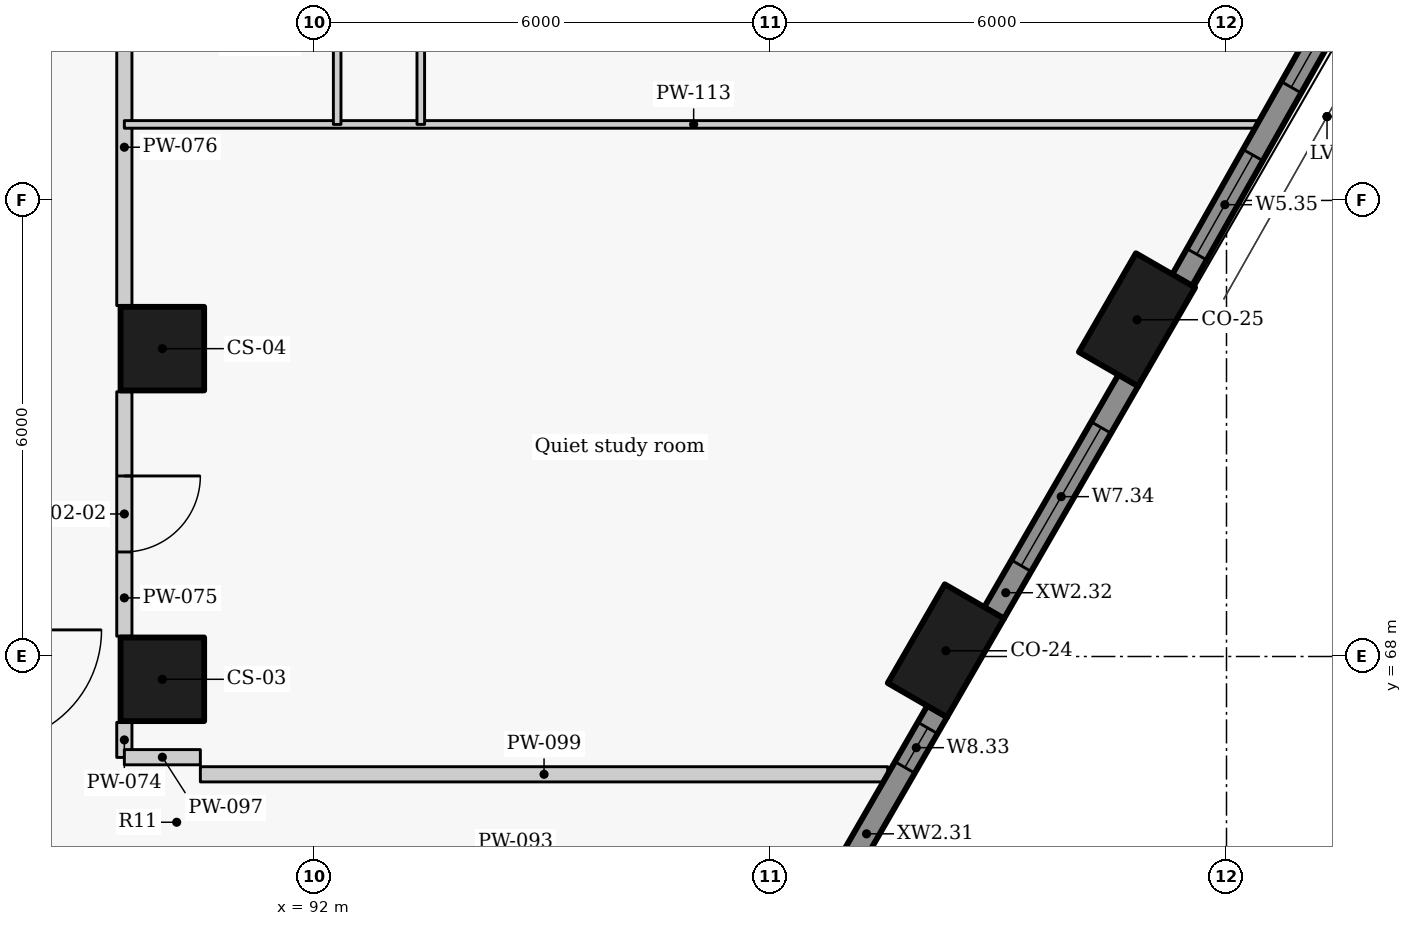
"""IFC4 building model, lengths in metres.
Left out: names, types, materials, properties, quantities, classifications, styles, units other than length and angle.
Written with IfcOpenShell. Run it as: python <this file> out.ifc"""

import sys

from ifc_helpers import new_model, si_unit, direction, frame, frame_2d, origin, origin_2d, place, context, subcontext, project, spatial, rectangle, extrude, element, fill, save


model = new_model("IFC4")
c1 = context("Model", 3, precision=1e-05, world=origin(), true_north=direction((0.0, 1.0)))
c2 = subcontext(c1, "Body", "Model", "MODEL_VIEW")
j1 = project(units=[si_unit("LENGTHUNIT", "METRE"), si_unit("PLANEANGLEUNIT", "RADIAN")], contexts=[c1])
p1 = place(None, origin())
s1 = spatial("IfcSite", under=j1, at=p1, CompositionType="ELEMENT")
p2 = place(p1, origin())
s2 = spatial("IfcBuilding", under=s1, at=p2, CompositionType="ELEMENT")
p3 = place(p2, frame((0.0, 0.0, 67.8)))
s3 = spatial("IfcBuildingStorey", under=s2, at=p3, CompositionType="ELEMENT", Elevation=67.8)
for number, where, z_axis, x_axis in (
    (1, (100.308, 68.075, 0.0), (0.0, 0.0, 1.0), (0.5, 0.866, 0.0)),
    (2, (102.823, 72.43, 0.0), (0.0, 0.0, 1.0), (0.5, 0.866, 0.0)),
):
    element("IfcColumn", number, at=place(p3, frame(where, z_axis=z_axis, x_axis=x_axis)), inside=s3, PredefinedType="COLUMN", context=c2, shape_type="SweptSolid", body=[
        extrude(rectangle(XDim=1.5, YDim=0.9, at=origin_2d()), origin(), (0.0, 0.0, 1.0), 3.3),
    ])
for number, where, z_axis, x_axis in (
    (3, (90.0, 67.7, 0.0), (0.0, 0.0, 1.0), (0.0, 1.0, 0.0)),
    (4, (90.0, 72.05, 0.0), (0.0, 0.0, 1.0), (0.0, 1.0, 0.0)),
):
    element("IfcColumn", number, at=place(p3, frame(where, z_axis=z_axis, x_axis=x_axis)), inside=s3, PredefinedType="COLUMN", context=c2, shape_type="SweptSolid", body=[
        extrude(rectangle(XDim=1.1, YDim=1.1, at=origin_2d()), origin(), (0.0, 0.0, 1.0), 3.3),
    ])
p4 = place(p3, frame((98.278, 63.959, 0.0), z_axis=(0.0, 0.0, 1.0), x_axis=(0.500001735503, 0.866024401789, 0.0)))
e5 = element("IfcWall", 5, at=p4, inside=s3, PredefinedType="SOLIDWALL", context=c2, shape_type="SweptSolid", body=[
    extrude(rectangle(XDim=3.834, YDim=0.3, at=frame_2d((1.917, 0.0))), origin(), (0.0, 0.0, 1.0), 2.05),
])
p5 = place(p4, frame((0.364, 0.0, 0.9)))
e6 = element("IfcOpeningElement", 6, at=p5, cuts=e5, PredefinedType="OPENING", context=c2, shape_type="SweptSolid", body=[
    extrude(rectangle(XDim=0.6, YDim=1.1, at=frame_2d((0.3, 0.55))), frame((0.0, 0.16, 0.0), z_axis=(0.0, -1.0, 0.0), x_axis=(1.0, 0.0, 0.0)), (0.0, 0.0, 1.0), 0.32),
])
p6 = place(p4, frame((2.981, 0.0, 0.9)))
e7 = element("IfcOpeningElement", 7, at=p6, cuts=e5, PredefinedType="OPENING", context=c2, shape_type="SweptSolid", body=[
    extrude(rectangle(XDim=0.6, YDim=1.1, at=frame_2d((0.3, 0.55))), frame((0.0, 0.16, 0.0), z_axis=(0.0, -1.0, 0.0), x_axis=(1.0, 0.0, 0.0)), (0.0, 0.0, 1.0), 0.32),
])
p7 = place(p3, frame((100.941, 68.571, 0.0), z_axis=(0.0, 0.0, 1.0), x_axis=(0.499977402622, 0.866038449993, 0.0)))
e8 = element("IfcWall", 8, at=p7, inside=s3, PredefinedType="SOLIDWALL", context=c2, shape_type="SweptSolid", body=[
    extrude(rectangle(XDim=3.537, YDim=0.3, at=frame_2d((1.769, 0.0))), origin(), (0.0, 0.0, 1.0), 2.05),
])
p8 = place(p7, frame((0.719, 0.0, 0.9)))
e9 = element("IfcOpeningElement", 9, at=p8, cuts=e8, PredefinedType="OPENING", context=c2, shape_type="SweptSolid", body=[
    extrude(rectangle(XDim=2.1, YDim=1.1, at=frame_2d((1.05, 0.55))), frame((0.0, 0.16, 0.0), z_axis=(0.0, -1.0, 0.0), x_axis=(1.0, 0.0, 0.0)), (0.0, 0.0, 1.0), 0.32),
])
p9 = place(p3, frame((103.416, 72.949, 0.0), z_axis=(0.0, 0.0, 1.0), x_axis=(0.492363204642, 0.870389840655, 0.0)))
e10 = element("IfcWall", 10, at=p9, inside=s3, PredefinedType="SOLIDWALL", context=c2, shape_type="SweptSolid", body=[
    extrude(rectangle(XDim=5.626, YDim=0.3, at=frame_2d((2.813, 0.0))), origin(), (0.0, 0.0, 1.0), 2.05),
])
p10 = place(p9, frame((0.393, 0.0, 0.9)))
e11 = element("IfcOpeningElement", 11, at=p10, cuts=e10, PredefinedType="OPENING", context=c2, shape_type="SweptSolid", body=[
    extrude(rectangle(XDim=1.5, YDim=1.1, at=frame_2d((0.75, 0.55))), frame((0.0, 0.16, 0.0), z_axis=(0.0, -1.0, 0.0), x_axis=(1.0, 0.0, 0.0)), (0.0, 0.0, 1.0), 0.32),
])
p11 = place(p9, frame((2.917, 0.0, 0.9)))
e12 = element("IfcOpeningElement", 12, at=p11, cuts=e10, PredefinedType="OPENING", context=c2, shape_type="SweptSolid", body=[
    extrude(rectangle(XDim=1.5, YDim=1.1, at=frame_2d((0.75, 0.55))), frame((0.0, 0.16, 0.0), z_axis=(0.0, -1.0, 0.0), x_axis=(1.0, 0.0, 0.0)), (0.0, 0.0, 1.0), 0.32),
])
p12 = place(p3, frame((89.5, 66.672, 0.0), z_axis=(0.0, 0.0, 1.0), x_axis=(0.0, 1.0, 0.0)))
e13 = element("IfcWall", 13, at=p12, inside=s3, PredefinedType="PARTITIONING", context=c2, shape_type="SweptSolid", body=[
    extrude(rectangle(XDim=0.461, YDim=0.2, at=frame_2d((0.23, 0.0))), origin(), (0.0, 0.0, 1.0), 2.95),
])
p13 = place(p3, frame((89.5, 71.483, 0.0), z_axis=(0.0, 0.0, 1.0), x_axis=(0.0, -1.0, 0.0)))
e14 = element("IfcWall", 14, at=p13, inside=s3, PredefinedType="PARTITIONING", context=c2, shape_type="SweptSolid", body=[
    extrude(rectangle(XDim=3.216, YDim=0.2, at=frame_2d((1.608, 0.0))), origin(), (0.0, 0.0, 1.0), 2.95),
])
p14 = place(p13, frame((1.108, 0.0, 0.0)))
e15 = element("IfcOpeningElement", 15, at=p14, cuts=e14, PredefinedType="OPENING", context=c2, shape_type="SweptSolid", body=[
    extrude(rectangle(XDim=1.0, YDim=2.1, at=frame_2d((0.5, 1.05))), frame((0.0, 0.11, 0.0), z_axis=(0.0, -1.0, 0.0), x_axis=(1.0, 0.0, 0.0)), (0.0, 0.0, 1.0), 0.22),
])
p15 = place(p3, frame((89.5, 72.617, 0.0), z_axis=(0.0, 0.0, 1.0), x_axis=(0.0, 1.0, 0.0)))
e16 = element("IfcWall", 16, at=p15, inside=s3, PredefinedType="PARTITIONING", context=c2, shape_type="SweptSolid", body=[
    extrude(rectangle(XDim=4.166, YDim=0.2, at=frame_2d((2.083, 0.0))), origin(), (0.0, 0.0, 1.0), 2.95),
])
p16 = place(p3, frame((89.5, 66.675, 0.0), z_axis=(0.0, 0.0, 1.0), x_axis=(1.0, 0.0, 0.0)))
e17 = element("IfcWall", 17, at=p16, inside=s3, PredefinedType="PARTITIONING", context=c2, shape_type="SweptSolid", body=[
    extrude(rectangle(XDim=1.0, YDim=0.2, at=frame_2d((0.5, 0.0))), origin(), (0.0, 0.0, 1.0), 2.43),
])
p17 = place(p3, frame((90.5, 66.45, 0.0), z_axis=(0.0, 0.0, 1.0), x_axis=(1.0, 0.0, 0.0)))
e18 = element("IfcWall", 18, at=p17, inside=s3, PredefinedType="PARTITIONING", context=c2, shape_type="SweptSolid", body=[
    extrude(rectangle(XDim=9.043, YDim=0.2, at=frame_2d((4.521, 0.0))), origin(), (0.0, 0.0, 1.0), 2.03),
])
p18 = place(p3, frame((89.5, 75.0, 0.0), z_axis=(0.0, 0.0, 1.0), x_axis=(1.0, 0.0, 0.0)))
e19 = element("IfcWall", 19, at=p18, inside=s3, PredefinedType="PARTITIONING", context=c2, shape_type="SweptSolid", body=[
    extrude(rectangle(XDim=14.979, YDim=0.1, at=frame_2d((7.49, 0.0))), origin(), (0.0, 0.0, 1.0), 2.03),
])
p19 = place(p3, frame((92.3, 75.0, 0.0), z_axis=(0.0, 0.0, 1.0), x_axis=(0.0, 1.0, 0.0)))
e20 = element("IfcWall", 20, at=p19, inside=s3, PredefinedType="PARTITIONING", context=c2, shape_type="SweptSolid", body=[
    extrude(rectangle(XDim=8.4, YDim=0.1, at=frame_2d((4.2, 0.0))), origin(), (0.0, 0.0, 1.0), 2.95),
])
p20 = place(p19, frame((1.841, 0.0, 0.0)))
e21 = element("IfcOpeningElement", 21, at=p20, cuts=e20, PredefinedType="OPENING", context=c2, shape_type="SweptSolid", body=[
    extrude(rectangle(XDim=0.9, YDim=2.1, at=frame_2d((0.45, 1.05))), frame((0.0, 0.06, 0.0), z_axis=(0.0, -1.0, 0.0), x_axis=(1.0, 0.0, 0.0)), (0.0, 0.0, 1.0), 0.12),
])
p21 = place(p19, frame((6.066, 0.0, 0.0)))
e22 = element("IfcOpeningElement", 22, at=p21, cuts=e20, PredefinedType="OPENING", context=c2, shape_type="SweptSolid", body=[
    extrude(rectangle(XDim=0.85, YDim=2.1, at=frame_2d((0.425, 1.05))), frame((0.0, 0.06, 0.0), z_axis=(0.0, -1.0, 0.0), x_axis=(1.0, 0.0, 0.0)), (0.0, 0.0, 1.0), 0.12),
])
p22 = place(p3, frame((93.4, 94.25, 0.0), z_axis=(0.0, 0.0, 1.0), x_axis=(0.0, -1.0, 0.0)))
e23 = element("IfcWall", 23, at=p22, inside=s3, PredefinedType="PARTITIONING", context=c2, shape_type="SweptSolid", body=[
    extrude(rectangle(XDim=19.25, YDim=0.1, at=frame_2d((9.625, 0.0))), origin(), (0.0, 0.0, 1.0), 2.95),
])
p23 = place(p22, frame((17.348, 0.0, 0.0)))
e24 = element("IfcOpeningElement", 24, at=p23, cuts=e23, PredefinedType="OPENING", context=c2, shape_type="SweptSolid", body=[
    extrude(rectangle(XDim=0.9, YDim=2.1, at=frame_2d((0.45, 1.05))), frame((0.0, 0.06, 0.0), z_axis=(0.0, -1.0, 0.0), x_axis=(1.0, 0.0, 0.0)), (0.0, 0.0, 1.0), 0.12),
])
p24 = place(p22, frame((14.445, 0.0, 0.0)))
e25 = element("IfcOpeningElement", 25, at=p24, cuts=e23, PredefinedType="OPENING", context=c2, shape_type="SweptSolid", body=[
    extrude(rectangle(XDim=0.9, YDim=2.1, at=frame_2d((0.45, 1.05))), frame((0.0, 0.06, 0.0), z_axis=(0.0, -1.0, 0.0), x_axis=(1.0, 0.0, 0.0)), (0.0, 0.0, 1.0), 0.12),
])
p25 = place(p22, frame((10.897, 0.0, 0.0)))
e26 = element("IfcOpeningElement", 26, at=p25, cuts=e23, PredefinedType="OPENING", context=c2, shape_type="SweptSolid", body=[
    extrude(rectangle(XDim=0.9, YDim=2.1, at=frame_2d((0.45, 1.05))), frame((0.0, 0.06, 0.0), z_axis=(0.0, -1.0, 0.0), x_axis=(1.0, 0.0, 0.0)), (0.0, 0.0, 1.0), 0.12),
])
p26 = place(p22, frame((7.4, 0.0, 0.0)))
e27 = element("IfcOpeningElement", 27, at=p26, cuts=e23, PredefinedType="OPENING", context=c2, shape_type="SweptSolid", body=[
    extrude(rectangle(XDim=0.9, YDim=2.1, at=frame_2d((0.45, 1.05))), frame((0.0, 0.06, 0.0), z_axis=(0.0, -1.0, 0.0), x_axis=(1.0, 0.0, 0.0)), (0.0, 0.0, 1.0), 0.12),
])
p27 = place(p22, frame((4.6, 0.0, 0.0)))
e28 = element("IfcOpeningElement", 28, at=p27, cuts=e23, PredefinedType="OPENING", context=c2, shape_type="SweptSolid", body=[
    extrude(rectangle(XDim=0.9, YDim=2.1, at=frame_2d((0.45, 1.05))), frame((0.0, 0.06, 0.0), z_axis=(0.0, -1.0, 0.0), x_axis=(1.0, 0.0, 0.0)), (0.0, 0.0, 1.0), 0.12),
])
p28 = place(p22, frame((1.375, 0.0, 0.0)))
e29 = element("IfcOpeningElement", 29, at=p28, cuts=e23, PredefinedType="OPENING", context=c2, shape_type="SweptSolid", body=[
    extrude(rectangle(XDim=0.9, YDim=2.1, at=frame_2d((0.45, 1.05))), frame((0.0, 0.06, 0.0), z_axis=(0.0, -1.0, 0.0), x_axis=(1.0, 0.0, 0.0)), (0.0, 0.0, 1.0), 0.12),
])
p29 = place(p6, origin())
e30 = element("IfcWindow", 30, at=p29, inside=s3, PartitioningType="SINGLE_PANEL", PredefinedType="WINDOW", context=c2, shape_type="SweptSolid", body=[
    extrude(rectangle(XDim=0.6, YDim=1.1, at=frame_2d((0.3, 0.55))), frame((0.0, 0.03, 0.0), z_axis=(0.0, -1.0, 0.0), x_axis=(1.0, 0.0, 0.0)), (0.0, 0.0, 1.0), 0.06),
])
fill(e7, e30)
p30 = place(p8, origin())
e31 = element("IfcWindow", 31, at=p30, inside=s3, PartitioningType="SINGLE_PANEL", PredefinedType="WINDOW", context=c2, shape_type="SweptSolid", body=[
    extrude(rectangle(XDim=2.1, YDim=1.1, at=frame_2d((1.05, 0.55))), frame((0.0, 0.03, 0.0), z_axis=(0.0, -1.0, 0.0), x_axis=(1.0, 0.0, 0.0)), (0.0, 0.0, 1.0), 0.06),
])
fill(e9, e31)
p31 = place(p10, origin())
e32 = element("IfcWindow", 32, at=p31, inside=s3, PartitioningType="SINGLE_PANEL", PredefinedType="WINDOW", context=c2, shape_type="SweptSolid", body=[
    extrude(rectangle(XDim=1.5, YDim=1.1, at=frame_2d((0.75, 0.55))), frame((0.0, 0.03, 0.0), z_axis=(0.0, -1.0, 0.0), x_axis=(1.0, 0.0, 0.0)), (0.0, 0.0, 1.0), 0.06),
])
fill(e11, e32)
p32 = place(p11, origin())
e33 = element("IfcWindow", 33, at=p32, inside=s3, PartitioningType="SINGLE_PANEL", PredefinedType="WINDOW", context=c2, shape_type="SweptSolid", body=[
    extrude(rectangle(XDim=1.5, YDim=1.1, at=frame_2d((0.75, 0.55))), frame((0.0, 0.03, 0.0), z_axis=(0.0, -1.0, 0.0), x_axis=(1.0, 0.0, 0.0)), (0.0, 0.0, 1.0), 0.06),
])
fill(e12, e33)
p33 = place(p14, origin())
e34 = element("IfcDoor", 34, at=p33, inside=s3, OperationType="SINGLE_SWING_LEFT", PredefinedType="DOOR", context=c2, shape_type="SweptSolid", body=[
    extrude(rectangle(XDim=1.0, YDim=2.1, at=frame_2d((0.5, 1.05))), frame((0.0, 0.025, 0.0), z_axis=(0.0, -1.0, 0.0), x_axis=(1.0, 0.0, 0.0)), (0.0, 0.0, 1.0), 0.05),
])
fill(e15, e34)
save(model, sys.argv[1])
